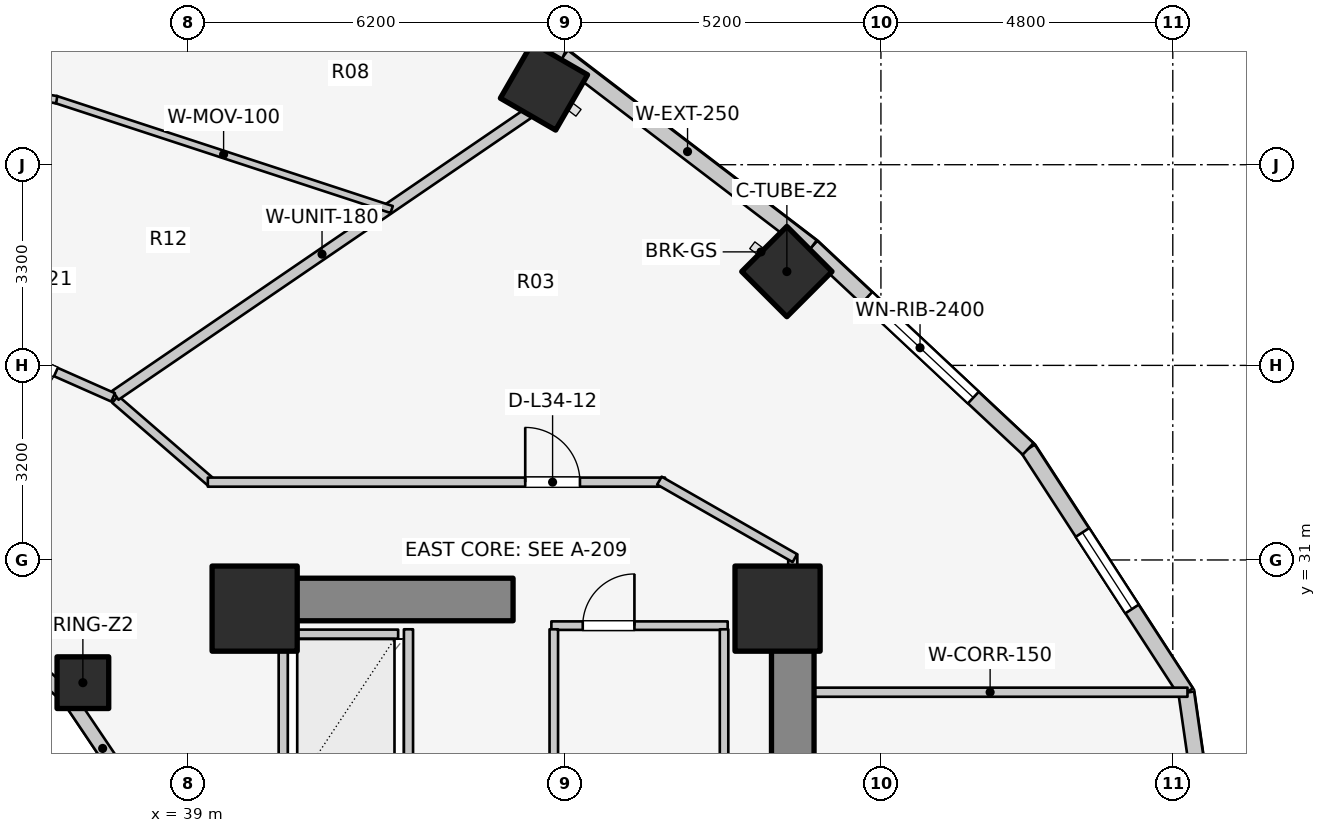
"""IFC4 building model, lengths in metres.
Left out: names, types, materials, properties, quantities, classifications, styles, units other than length and angle.
Written with IfcOpenShell. Run it as: python <this file> out.ifc"""

import sys

from ifc_helpers import new_model, si_unit, direction, frame, frame_2d, origin, origin_2d, place, context, subcontext, project, spatial, rectangle, extrude, element, fill, save


model = new_model("IFC4")
c1 = context("Model", 3, precision=1e-05, world=origin(), true_north=direction((0.0, 1.0)))
c2 = subcontext(c1, "Body", "Model", "MODEL_VIEW")
j1 = project(units=[si_unit("LENGTHUNIT", "METRE"), si_unit("PLANEANGLEUNIT", "RADIAN")], contexts=[c1])
p1 = place(None, origin())
s1 = spatial("IfcSite", under=j1, at=p1, CompositionType="ELEMENT")
p2 = place(p1, origin())
s2 = spatial("IfcBuilding", under=s1, at=p2, CompositionType="ELEMENT")
p3 = place(p2, frame((0.0, 0.0, 113.5)))
s3 = spatial("IfcBuildingStorey", under=s2, at=p3, CompositionType="ELEMENT", Elevation=113.5)
p4 = place(p3, frame((48.95, 17.05, 0.0), z_axis=(0.0, 0.0, 1.0), x_axis=(0.0, 1.0, 0.0)))
e1 = element("IfcWall", 1, at=p4, inside=s3, PredefinedType="SHEAR", context=c2, shape_type="SweptSolid", body=[
    extrude(rectangle(XDim=12.8, YDim=0.7, at=frame_2d((6.4, 0.0))), origin(), (0.0, 0.0, 1.0), 3.1),
])
p5 = place(p3, frame((39.85, 30.35, 0.0), z_axis=(0.0, 0.0, 1.0), x_axis=(1.0, 0.0, 0.0)))
e2 = element("IfcWall", 2, at=p5, inside=s3, PredefinedType="SHEAR", context=c2, shape_type="SweptSolid", body=[
    extrude(rectangle(XDim=4.5, YDim=0.7, at=frame_2d((2.25, 0.0))), origin(), (0.0, 0.0, 1.0), 3.1),
])
for number, where, z_axis, x_axis in (
    (3, (48.7, 30.2, 0.0), (0.0, 0.0, 1.0), (1.0, 0.0, 0.0)),
    (4, (40.1, 30.2, 0.0), (0.0, 0.0, 1.0), (1.0, 0.0, 0.0)),
):
    element("IfcColumn", number, at=place(p3, frame(where, z_axis=z_axis, x_axis=x_axis)), inside=s3, PredefinedType="COLUMN", context=c2, shape_type="SweptSolid", body=[
        extrude(rectangle(XDim=1.4, YDim=1.4, at=origin_2d()), origin(), (0.0, 0.0, 1.0), 3.1),
    ])
p6 = place(p3, frame((37.275, 28.982, 0.0), z_axis=(0.0, 0.0, 1.0), x_axis=(1.0, 0.0, 0.0)))
e5 = element("IfcColumn", 5, at=p6, inside=s3, PredefinedType="COLUMN", context=c2, shape_type="SweptSolid", body=[
    extrude(rectangle(XDim=0.85, YDim=0.85, at=origin_2d()), origin(), (0.0, 0.0, 1.0), 3.1),
])
for number, where, z_axis, x_axis in (
    (6, (48.853, 35.743, 0.0), (0.0, 0.0, 1.0), (0.707, 0.707, 0.0)),
    (7, (44.858, 38.786, 0.0), (0.0, 0.0, 1.0), (0.5, 0.866, 0.0)),
):
    element("IfcColumn", number, at=place(p3, frame(where, z_axis=z_axis, x_axis=x_axis)), inside=s3, PredefinedType="COLUMN", context=c2, shape_type="SweptSolid", body=[
        extrude(rectangle(XDim=1.05, YDim=1.05, at=origin_2d()), origin(), (0.0, 0.0, 1.0), 3.1),
    ])
p7 = place(p3, frame((38.166, 27.06, 0.0), z_axis=(0.0, 0.0, 1.0), x_axis=(-0.558197800898, 0.829707909492, 0.0)))
e8 = element("IfcWall", 8, at=p7, inside=s3, PredefinedType="STANDARD", context=c2, shape_type="SweptSolid", body=[
    extrude(rectangle(XDim=2.027, YDim=0.23, at=frame_2d((1.013, 0.0))), origin(), (0.0, 0.0, 1.0), 2.16),
])
p8 = place(p3, frame((37.035, 28.742, 0.0), z_axis=(0.0, 0.0, 1.0), x_axis=(-0.752576694707, 0.658504607869, 0.0)))
e9 = element("IfcWall", 9, at=p8, inside=s3, PredefinedType="STANDARD", context=c2, shape_type="SweptSolid", body=[
    extrude(rectangle(XDim=1.959, YDim=0.23, at=frame_2d((0.98, 0.0))), origin(), (0.0, 0.0, 1.0), 2.16),
])
p9 = place(p3, frame((56.26, 23.0, 0.0), z_axis=(0.0, 0.0, 1.0), x_axis=(-0.142572472068, 0.98978436551, 0.0)))
e10 = element("IfcWall", 10, at=p9, inside=s3, PredefinedType="STANDARD", context=c2, shape_type="SweptSolid", body=[
    extrude(rectangle(XDim=5.879, YDim=0.26, at=frame_2d((2.939, 0.0))), origin(), (0.0, 0.0, 1.0), 2.85),
])
p10 = place(p9, frame((2.189, 0.0, 0.75)))
e11 = element("IfcOpeningElement", 11, at=p10, cuts=e10, PredefinedType="OPENING", context=c2, shape_type="SweptSolid", body=[
    extrude(rectangle(XDim=1.5, YDim=1.6, at=frame_2d((0.75, 0.8))), frame((0.0, 0.14, 0.0), z_axis=(0.0, -1.0, 0.0), x_axis=(1.0, 0.0, 0.0)), (0.0, 0.0, 1.0), 0.28),
])
p11 = place(p3, frame((55.422, 28.819, 0.0), z_axis=(0.0, 0.0, 1.0), x_axis=(-0.544388392991, 0.838833283541, 0.0)))
e12 = element("IfcWall", 12, at=p11, inside=s3, PredefinedType="STANDARD", context=c2, shape_type="SweptSolid", body=[
    extrude(rectangle(XDim=4.778, YDim=0.26, at=frame_2d((2.389, 0.0))), origin(), (0.0, 0.0, 1.0), 2.85),
])
p12 = place(p11, frame((1.639, 0.0, 0.75)))
e13 = element("IfcOpeningElement", 13, at=p12, cuts=e12, PredefinedType="OPENING", context=c2, shape_type="SweptSolid", body=[
    extrude(rectangle(XDim=1.5, YDim=1.6, at=frame_2d((0.75, 0.8))), frame((0.0, 0.14, 0.0), z_axis=(0.0, -1.0, 0.0), x_axis=(1.0, 0.0, 0.0)), (0.0, 0.0, 1.0), 0.28),
])
p13 = place(p3, frame((52.821, 32.827, 0.0), z_axis=(0.0, 0.0, 1.0), x_axis=(-0.730162452258, 0.68327358599, 0.0)))
e14 = element("IfcWall", 14, at=p13, inside=s3, PredefinedType="STANDARD", context=c2, shape_type="SweptSolid", body=[
    extrude(rectangle(XDim=4.868, YDim=0.26, at=frame_2d((2.434, 0.0))), origin(), (0.0, 0.0, 1.0), 2.85),
])
p14 = place(p13, frame((1.234, 0.0, 0.75)))
e15 = element("IfcOpeningElement", 15, at=p14, cuts=e14, PredefinedType="OPENING", context=c2, shape_type="SweptSolid", body=[
    extrude(rectangle(XDim=2.4, YDim=1.7, at=frame_2d((1.2, 0.85))), frame((0.0, 0.14, 0.0), z_axis=(0.0, -1.0, 0.0), x_axis=(1.0, 0.0, 0.0)), (0.0, 0.0, 1.0), 0.28),
])
p15 = place(p3, frame((49.266, 36.153, 0.0), z_axis=(0.0, 0.0, 1.0), x_axis=(-0.794809810864, 0.606858603427, 0.0)))
e16 = element("IfcWall", 16, at=p15, inside=s3, PredefinedType="STANDARD", context=c2, shape_type="SweptSolid", body=[
    extrude(rectangle(XDim=5.149, YDim=0.26, at=frame_2d((2.575, 0.0))), origin(), (0.0, 0.0, 1.0), 2.85),
])
p16 = place(p3, frame((45.173, 39.278, 0.0), z_axis=(0.0, 0.0, 1.0), x_axis=(-0.914336605747, 0.404955023911, 0.0)))
e17 = element("IfcWall", 17, at=p16, inside=s3, PredefinedType="STANDARD", context=c2, shape_type="SweptSolid", body=[
    extrude(rectangle(XDim=5.859, YDim=0.26, at=frame_2d((2.929, 0.0))), origin(), (0.0, 0.0, 1.0), 2.85),
])
p17 = place(p16, frame((2.179, 0.0, 0.75)))
e18 = element("IfcOpeningElement", 18, at=p17, cuts=e17, PredefinedType="OPENING", context=c2, shape_type="SweptSolid", body=[
    extrude(rectangle(XDim=1.5, YDim=1.6, at=frame_2d((0.75, 0.8))), frame((0.0, 0.14, 0.0), z_axis=(0.0, -1.0, 0.0), x_axis=(1.0, 0.0, 0.0)), (0.0, 0.0, 1.0), 0.28),
])
p18 = place(p3, frame((40.74, 29.78, 0.0), z_axis=(0.0, 0.0, 1.0), x_axis=(1.0, 0.0, 0.0)))
e19 = element("IfcWall", 19, at=p18, inside=s3, PredefinedType="SOLIDWALL", context=c2, shape_type="SweptSolid", body=[
    extrude(rectangle(XDim=1.72, YDim=0.15, at=frame_2d((0.86, 0.0))), origin(), (0.0, 0.0, 1.0), 2.855),
])
for number, where, z_axis, x_axis in (
    (20, (40.57, 27.14, 0.0), (0.0, 0.0, 1.0), (0.0, 1.0, 0.0)),
    (21, (42.63, 27.14, 0.0), (0.0, 0.0, 1.0), (0.0, 1.0, 0.0)),
):
    element("IfcWall", number, at=place(p3, frame(where, z_axis=z_axis, x_axis=x_axis)), inside=s3, PredefinedType="SOLIDWALL", context=c2, shape_type="SweptSolid", body=[
        extrude(rectangle(XDim=2.72, YDim=0.15, at=frame_2d((1.36, 0.0))), origin(), (0.0, 0.0, 1.0), 2.855),
    ])
p19 = place(p3, frame((44.98, 29.92, 0.0), z_axis=(0.0, 0.0, 1.0), x_axis=(1.0, 0.0, 0.0)))
e22 = element("IfcWall", 22, at=p19, inside=s3, PredefinedType="PLUMBINGWALL", context=c2, shape_type="SweptSolid", body=[
    extrude(rectangle(XDim=2.9, YDim=0.14, at=frame_2d((1.45, 0.0))), origin(), (0.0, 0.0, 1.0), 2.855),
])
p20 = place(p19, frame((0.516, 0.0, 0.0)))
e23 = element("IfcOpeningElement", 23, at=p20, cuts=e22, PredefinedType="OPENING", context=c2, shape_type="SweptSolid", body=[
    extrude(rectangle(XDim=0.85, YDim=2.05, at=frame_2d((0.425, 1.025))), frame((0.0, 0.08, 0.0), z_axis=(0.0, -1.0, 0.0), x_axis=(1.0, 0.0, 0.0)), (0.0, 0.0, 1.0), 0.16),
])
for number, where, z_axis, x_axis in (
    (24, (45.02, 25.98, 0.0), (0.0, 0.0, 1.0), (0.0, 1.0, 0.0)),
    (25, (47.82, 25.98, 0.0), (0.0, 0.0, 1.0), (0.0, 1.0, 0.0)),
):
    element("IfcWall", number, at=place(p3, frame(where, z_axis=z_axis, x_axis=x_axis)), inside=s3, PredefinedType="PLUMBINGWALL", context=c2, shape_type="SweptSolid", body=[
        extrude(rectangle(XDim=3.88, YDim=0.14, at=frame_2d((1.94, 0.0))), origin(), (0.0, 0.0, 1.0), 2.855),
    ])
p21 = place(p3, frame((48.95, 28.825, 0.0), z_axis=(0.0, 0.0, 1.0), x_axis=(1.0, 0.0, 0.0)))
e26 = element("IfcWall", 26, at=p21, inside=s3, PredefinedType="PARTITIONING", context=c2, shape_type="SweptSolid", body=[
    extrude(rectangle(XDim=6.492, YDim=0.15, at=frame_2d((3.246, 0.0))), origin(), (0.0, 0.0, 1.0), 2.855),
])
p22 = place(p3, frame((48.95, 29.8, 0.0), z_axis=(0.0, 0.0, 1.0), x_axis=(0.0, 1.0, 0.0)))
e27 = element("IfcWall", 27, at=p22, inside=s3, PredefinedType="PARTITIONING", context=c2, shape_type="SweptSolid", body=[
    extrude(rectangle(XDim=1.29, YDim=0.15, at=frame_2d((0.645, 0.0))), origin(), (0.0, 0.0, 1.0), 2.142),
])
p23 = place(p3, frame((37.807, 33.642, 0.0), z_axis=(0.0, 0.0, 1.0), x_axis=(0.756055312247, -0.654507727092, 0.0)))
e28 = element("IfcWall", 28, at=p23, inside=s3, PredefinedType="PARTITIONING", context=c2, shape_type="SweptSolid", body=[
    extrude(rectangle(XDim=2.111, YDim=0.15, at=frame_2d((1.055, 0.0))), origin(), (0.0, 0.0, 1.0), 2.272),
])
p24 = place(p3, frame((39.33, 32.28, 0.0), z_axis=(0.0, 0.0, 1.0), x_axis=(1.0, 0.0, 0.0)))
e29 = element("IfcWall", 29, at=p24, inside=s3, PredefinedType="PARTITIONING", context=c2, shape_type="SweptSolid", body=[
    extrude(rectangle(XDim=7.52, YDim=0.15, at=frame_2d((3.76, 0.0))), origin(), (0.0, 0.0, 1.0), 2.272),
])
p25 = place(p24, frame((5.22, 0.0, 0.0)))
e30 = element("IfcOpeningElement", 30, at=p25, cuts=e29, PredefinedType="OPENING", context=c2, shape_type="SweptSolid", body=[
    extrude(rectangle(XDim=0.9, YDim=2.1, at=frame_2d((0.45, 1.05))), frame((0.0, 0.085, 0.0), z_axis=(0.0, -1.0, 0.0), x_axis=(1.0, 0.0, 0.0)), (0.0, 0.0, 1.0), 0.17),
])
p26 = place(p3, frame((46.757, 32.305, 0.0), z_axis=(0.0, 0.0, 1.0), x_axis=(0.867991349648, -0.496579315857, 0.0)))
e31 = element("IfcWall", 31, at=p26, inside=s3, PredefinedType="PARTITIONING", context=c2, shape_type="SweptSolid", body=[
    extrude(rectangle(XDim=2.567, YDim=0.15, at=frame_2d((1.283, 0.0))), origin(), (0.0, 0.0, 1.0), 2.142),
])
p27 = place(p3, frame((37.81, 33.709, 0.0), z_axis=(0.0, 0.0, 1.0), x_axis=(0.825850521911, 0.563889098546, 0.0)))
e32 = element("IfcWall", 32, at=p27, inside=s3, PredefinedType="PARTITIONING", context=c2, shape_type="SweptSolid", body=[
    extrude(rectangle(XDim=8.228, YDim=0.18, at=frame_2d((4.114, 0.0))), origin(), (0.0, 0.0, 1.0), 2.272),
])
p28 = place(p3, frame((42.354, 36.763, 0.0), z_axis=(0.0, 0.0, 1.0), x_axis=(-0.950307315297, 0.311313357396, 0.0)))
e33 = element("IfcWall", 33, at=p28, inside=s3, PredefinedType="MOVABLE", context=c2, shape_type="SweptSolid", body=[
    extrude(rectangle(XDim=5.817, YDim=0.12, at=frame_2d((2.909, 0.0))), origin(), (0.0, 0.0, 1.0), 2.272),
])
p29 = place(p3, frame((36.845, 38.57, 0.0), z_axis=(0.0, 0.0, 1.0), x_axis=(-0.987504798288, 0.157588937929, 0.0)))
e34 = element("IfcWall", 34, at=p29, inside=s3, PredefinedType="MOVABLE", context=c2, shape_type="SweptSolid", body=[
    extrude(rectangle(XDim=4.956, YDim=0.12, at=frame_2d((2.478, 0.0))), origin(), (0.0, 0.0, 1.0), 2.272),
])
p30 = place(p29, frame((2.003, 0.0, 0.0)))
e35 = element("IfcOpeningElement", 35, at=p30, cuts=e34, PredefinedType="OPENING", context=c2, shape_type="SweptSolid", body=[
    extrude(rectangle(XDim=0.95, YDim=2.1, at=frame_2d((0.475, 1.05))), frame((0.0, 0.07, 0.0), z_axis=(0.0, -1.0, 0.0), x_axis=(1.0, 0.0, 0.0)), (0.0, 0.0, 1.0), 0.14),
])
p31 = place(p3, frame((37.772, 33.674, 0.0), z_axis=(0.0, 0.0, 1.0), x_axis=(-0.914324470734, 0.404982422108, 0.0)))
e36 = element("IfcWall", 36, at=p31, inside=s3, PredefinedType="PARTITIONING", context=c2, shape_type="SweptSolid", body=[
    extrude(rectangle(XDim=3.058, YDim=0.15, at=frame_2d((1.529, 0.0))), origin(), (0.0, 0.0, 1.0), 2.272),
])
p32 = place(p31, frame((1.029, 0.0, 0.0)))
e37 = element("IfcOpeningElement", 37, at=p32, cuts=e36, PredefinedType="OPENING", context=c2, shape_type="SweptSolid", body=[
    extrude(rectangle(XDim=1.0, YDim=2.1, at=frame_2d((0.5, 1.05))), frame((0.0, 0.085, 0.0), z_axis=(0.0, -1.0, 0.0), x_axis=(1.0, 0.0, 0.0)), (0.0, 0.0, 1.0), 0.17),
])
p33 = place(p12, origin())
e38 = element("IfcWindow", 38, at=p33, inside=s3, PartitioningType="SINGLE_PANEL", PredefinedType="WINDOW", context=c2, shape_type="SweptSolid", body=[
    extrude(rectangle(XDim=1.5, YDim=1.6, at=frame_2d((0.75, 0.8))), frame((0.0, 0.03, 0.0), z_axis=(0.0, -1.0, 0.0), x_axis=(1.0, 0.0, 0.0)), (0.0, 0.0, 1.0), 0.06),
])
fill(e13, e38)
p34 = place(p14, origin())
e39 = element("IfcWindow", 39, at=p34, inside=s3, PartitioningType="SINGLE_PANEL", PredefinedType="WINDOW", context=c2, shape_type="SweptSolid", body=[
    extrude(rectangle(XDim=2.4, YDim=1.7, at=frame_2d((1.2, 0.85))), frame((0.0, 0.03, 0.0), z_axis=(0.0, -1.0, 0.0), x_axis=(1.0, 0.0, 0.0)), (0.0, 0.0, 1.0), 0.06),
])
fill(e15, e39)
p35 = place(p20, origin())
e40 = element("IfcDoor", 40, at=p35, inside=s3, OperationType="SINGLE_SWING_RIGHT", PredefinedType="DOOR", context=c2, shape_type="SweptSolid", body=[
    extrude(rectangle(XDim=0.85, YDim=2.05, at=frame_2d((0.425, 1.025))), frame((0.0, 0.025, 0.0), z_axis=(0.0, -1.0, 0.0), x_axis=(1.0, 0.0, 0.0)), (0.0, 0.0, 1.0), 0.05),
])
fill(e23, e40)
p36 = place(p25, origin())
e41 = element("IfcDoor", 41, at=p36, inside=s3, OperationType="SINGLE_SWING_LEFT", PredefinedType="DOOR", context=c2, shape_type="SweptSolid", body=[
    extrude(rectangle(XDim=0.9, YDim=2.1, at=frame_2d((0.45, 1.05))), frame((0.0, 0.025, 0.0), z_axis=(0.0, -1.0, 0.0), x_axis=(1.0, 0.0, 0.0)), (0.0, 0.0, 1.0), 0.05),
])
fill(e30, e41)
p37 = place(p32, origin())
e42 = element("IfcDoor", 42, at=p37, inside=s3, OperationType="SINGLE_SWING_RIGHT", PredefinedType="DOOR", context=c2, shape_type="SweptSolid", body=[
    extrude(rectangle(XDim=1.0, YDim=2.1, at=frame_2d((0.5, 1.05))), frame((0.0, 0.025, 0.0), z_axis=(0.0, -1.0, 0.0), x_axis=(1.0, 0.0, 0.0)), (0.0, 0.0, 1.0), 0.05),
])
fill(e37, e42)
save(model, sys.argv[1])
